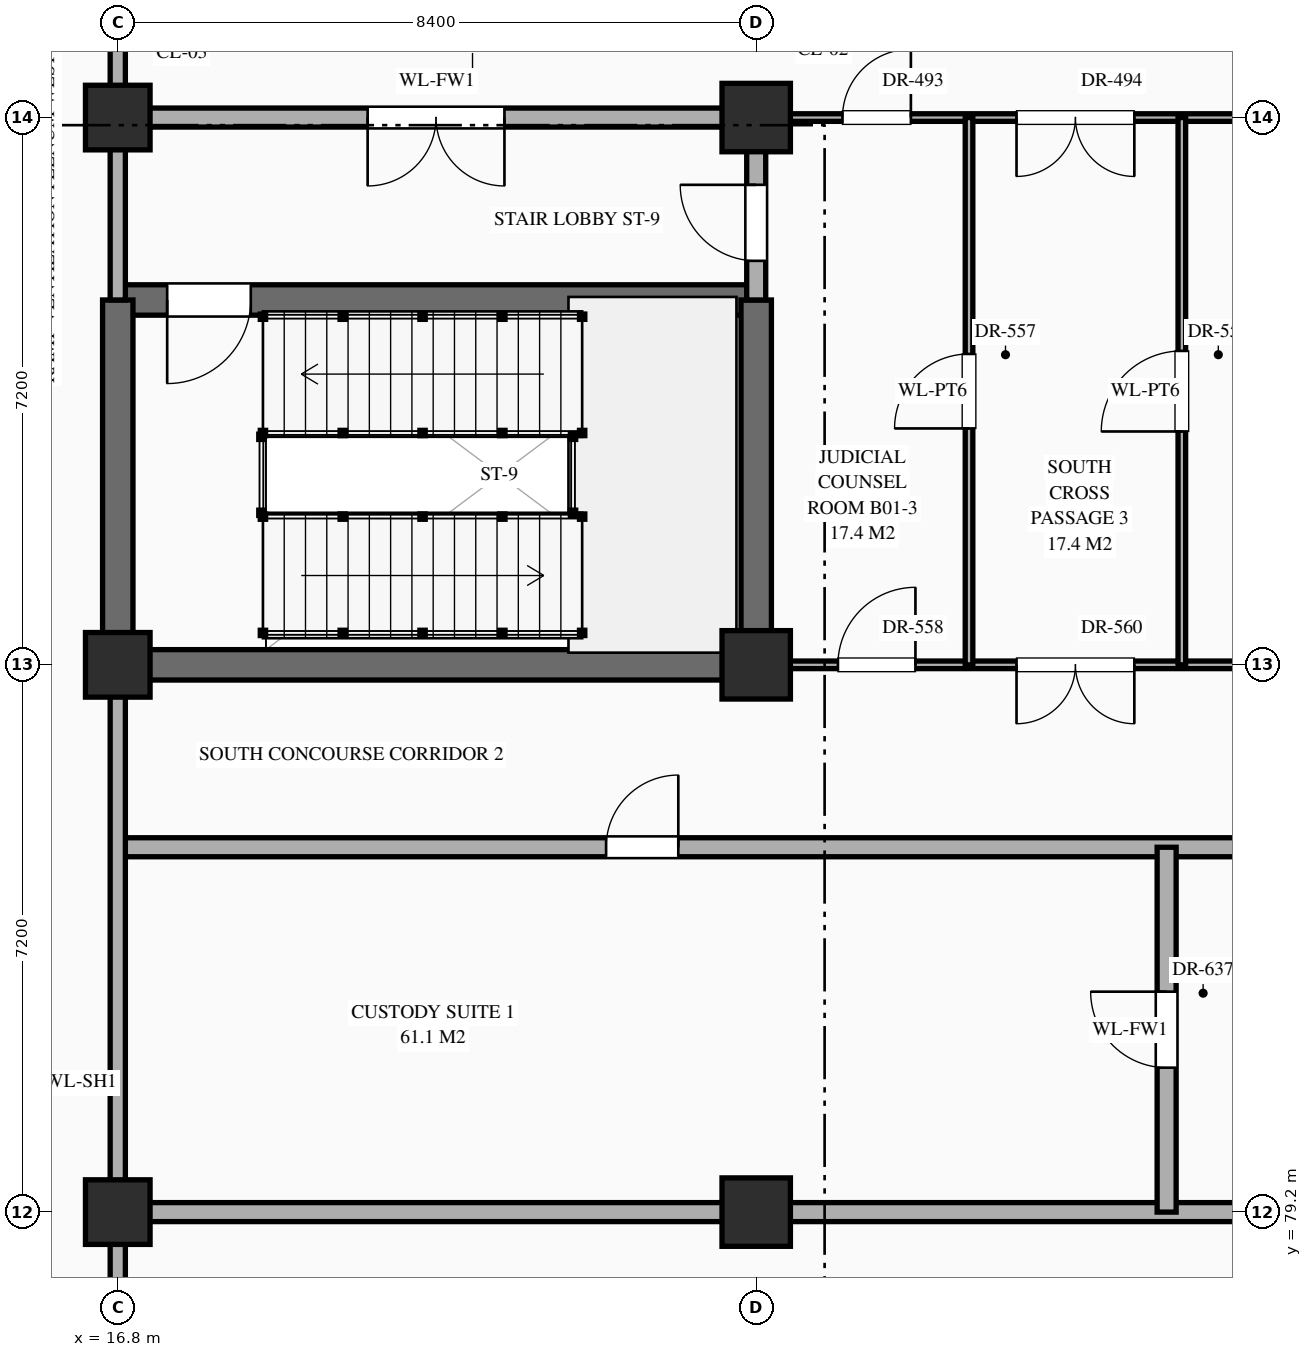
"""IFC4 building model, lengths in metres.
Left out: names, types, materials, properties, quantities, classifications, styles, units other than length and angle.
Written with IfcOpenShell. Run it as: python <this file> out.ifc"""

import sys

from ifc_helpers import new_model, si_unit, direction, frame, frame_2d, origin, origin_2d, place, context, subcontext, project, spatial, rectangle, extrude, element, fill, save


model = new_model("IFC4")
c1 = context("Model", 3, precision=1e-05, world=origin(), true_north=direction((0.0, 1.0)))
c2 = subcontext(c1, "Body", "Model", "MODEL_VIEW")
j1 = project(units=[si_unit("LENGTHUNIT", "METRE"), si_unit("PLANEANGLEUNIT", "RADIAN")], contexts=[c1])
p1 = place(None, origin())
s1 = spatial("IfcSite", under=j1, at=p1, CompositionType="ELEMENT")
p2 = place(p1, origin())
s2 = spatial("IfcBuilding", under=s1, at=p2, CompositionType="ELEMENT")
p3 = place(p2, frame((0.0, 0.0, -5.4)))
s3 = spatial("IfcBuildingStorey", under=s2, at=p3, CompositionType="ELEMENT", Elevation=-5.4)
for number, where, z_axis, x_axis in (
    (1, (16.8, 79.2, 0.0), (0.0, 0.0, 1.0), (1.0, 0.0, 0.0)),
    (2, (16.8, 86.4, 0.0), (0.0, 0.0, 1.0), (1.0, 0.0, 0.0)),
    (3, (16.8, 93.6, 0.0), (0.0, 0.0, 1.0), (1.0, 0.0, 0.0)),
):
    element("IfcColumn", number, at=place(p3, frame(where, z_axis=z_axis, x_axis=x_axis)), inside=s3, PredefinedType="COLUMN", context=c2, shape_type="SweptSolid", body=[
        extrude(rectangle(XDim=0.85, YDim=0.85, at=origin_2d()), origin(), (0.0, 0.0, 1.0), 5.4),
    ])
for number, where, z_axis, x_axis in (
    (4, (25.2, 79.2, 0.0), (0.0, 0.0, 1.0), (1.0, 0.0, 0.0)),
    (5, (25.2, 86.4, 0.0), (0.0, 0.0, 1.0), (1.0, 0.0, 0.0)),
    (6, (25.2, 93.6, 0.0), (0.0, 0.0, 1.0), (1.0, 0.0, 0.0)),
):
    element("IfcColumn", number, at=place(p3, frame(where, z_axis=z_axis, x_axis=x_axis)), inside=s3, PredefinedType="COLUMN", context=c2, shape_type="SweptSolid", body=[
        extrude(rectangle(XDim=0.9, YDim=0.9, at=origin_2d()), origin(), (0.0, 0.0, 1.0), 5.4),
    ])
p4 = place(p3, frame((16.8, 79.2, 0.0), z_axis=(0.0, 0.0, 1.0), x_axis=(1.0, 0.0, 0.0)))
e7 = element("IfcWall", 7, at=p4, inside=s3, PredefinedType="STANDARD", context=c2, shape_type="SweptSolid", body=[
    extrude(rectangle(XDim=33.6, YDim=0.25, at=frame_2d((16.8, 0.0))), origin(), (0.0, 0.0, 1.0), 4.13),
])
p5 = place(p3, frame((16.8, 84.0, 0.0), z_axis=(0.0, 0.0, 1.0), x_axis=(1.0, 0.0, 0.0)))
e8 = element("IfcWall", 8, at=p5, inside=s3, PredefinedType="STANDARD", context=c2, shape_type="SweptSolid", body=[
    extrude(rectangle(XDim=16.8, YDim=0.25, at=frame_2d((8.4, 0.0))), origin(), (0.0, 0.0, 1.0), 5.1),
])
p6 = place(p5, frame((6.425, 0.0, 0.0)))
e9 = element("IfcOpeningElement", 9, at=p6, cuts=e8, PredefinedType="OPENING", context=c2, shape_type="SweptSolid", body=[
    extrude(rectangle(XDim=0.95, YDim=2.15, at=frame_2d((0.475, 1.075))), frame((0.0, 0.137, 0.0), z_axis=(0.0, -1.0, 0.0), x_axis=(1.0, 0.0, 0.0)), (0.0, 0.0, 1.0), 0.274),
])
p7 = place(p3, frame((16.8, 86.4, 0.0), z_axis=(0.0, 0.0, 1.0), x_axis=(1.0, 0.0, 0.0)))
e10 = element("IfcWall", 10, at=p7, inside=s3, PredefinedType="SHEAR", context=c2, shape_type="SweptSolid", body=[
    extrude(rectangle(XDim=8.4, YDim=0.4, at=frame_2d((4.2, 0.0))), origin(), (0.0, 0.0, 1.0), 5.1),
])
p8 = place(p3, frame((25.2, 86.4, 0.0), z_axis=(0.0, 0.0, 1.0), x_axis=(1.0, 0.0, 0.0)))
e11 = element("IfcWall", 11, at=p8, inside=s3, PredefinedType="STANDARD", context=c2, shape_type="SweptSolid", body=[
    extrude(rectangle(XDim=16.8, YDim=0.1, at=frame_2d((8.4, 0.0))), origin(), (0.0, 0.0, 1.0), 4.25),
])
p9 = place(p8, frame((1.075, 0.0, 0.0)))
e12 = element("IfcOpeningElement", 12, at=p9, cuts=e11, PredefinedType="OPENING", context=c2, shape_type="SweptSolid", body=[
    extrude(rectangle(XDim=1.02, YDim=2.4, at=frame_2d((0.51, 1.2))), frame((0.0, 0.062, 0.0), z_axis=(0.0, -1.0, 0.0), x_axis=(1.0, 0.0, 0.0)), (0.0, 0.0, 1.0), 0.124),
])
p10 = place(p8, frame((3.425, 0.0, 0.0)))
e13 = element("IfcOpeningElement", 13, at=p10, cuts=e11, PredefinedType="OPENING", context=c2, shape_type="SweptSolid", body=[
    extrude(rectangle(XDim=1.55, YDim=2.35, at=frame_2d((0.775, 1.175))), frame((0.0, 0.062, 0.0), z_axis=(0.0, -1.0, 0.0), x_axis=(1.0, 0.0, 0.0)), (0.0, 0.0, 1.0), 0.124),
])
p11 = place(p8, frame((6.377, 0.0, 0.0)))
e14 = element("IfcOpeningElement", 14, at=p11, cuts=e11, PredefinedType="OPENING", context=c2, shape_type="SweptSolid", body=[
    extrude(rectangle(XDim=0.9, YDim=2.15, at=frame_2d((0.45, 1.075))), frame((0.0, 0.062, 0.0), z_axis=(0.0, -1.0, 0.0), x_axis=(1.0, 0.0, 0.0)), (0.0, 0.0, 1.0), 0.124),
])
p12 = place(p8, frame((12.157, 0.0, 0.0)))
e15 = element("IfcOpeningElement", 15, at=p12, cuts=e11, PredefinedType="OPENING", context=c2, shape_type="SweptSolid", body=[
    extrude(rectangle(XDim=0.86, YDim=2.1, at=frame_2d((0.43, 1.05))), frame((0.0, 0.062, 0.0), z_axis=(0.0, -1.0, 0.0), x_axis=(1.0, 0.0, 0.0)), (0.0, 0.0, 1.0), 0.124),
])
p13 = place(p3, frame((16.8, 91.2, 0.0), z_axis=(0.0, 0.0, 1.0), x_axis=(1.0, 0.0, 0.0)))
e16 = element("IfcWall", 16, at=p13, inside=s3, PredefinedType="SHEAR", context=c2, shape_type="SweptSolid", body=[
    extrude(rectangle(XDim=8.4, YDim=0.4, at=frame_2d((4.2, 0.0))), origin(), (0.0, 0.0, 1.0), 5.1),
])
p14 = place(p13, frame((0.65, 0.0, 0.0)))
e17 = element("IfcOpeningElement", 17, at=p14, cuts=e16, PredefinedType="OPENING", context=c2, shape_type="SweptSolid", body=[
    extrude(rectangle(XDim=1.1, YDim=2.2, at=frame_2d((0.55, 1.1))), frame((0.0, 0.212, 0.0), z_axis=(0.0, -1.0, 0.0), x_axis=(1.0, 0.0, 0.0)), (0.0, 0.0, 1.0), 0.424),
])
p15 = place(p3, frame((16.8, 93.6, 0.0), z_axis=(0.0, 0.0, 1.0), x_axis=(1.0, 0.0, 0.0)))
e18 = element("IfcWall", 18, at=p15, inside=s3, PredefinedType="STANDARD", context=c2, shape_type="SweptSolid", body=[
    extrude(rectangle(XDim=8.4, YDim=0.25, at=frame_2d((4.2, 0.0))), origin(), (0.0, 0.0, 1.0), 4.25),
])
p16 = place(p15, frame((3.288, 0.0, 0.0)))
e19 = element("IfcOpeningElement", 19, at=p16, cuts=e18, PredefinedType="OPENING", context=c2, shape_type="SweptSolid", body=[
    extrude(rectangle(XDim=1.8, YDim=2.35, at=frame_2d((0.9, 1.175))), frame((0.0, 0.137, 0.0), z_axis=(0.0, -1.0, 0.0), x_axis=(1.0, 0.0, 0.0)), (0.0, 0.0, 1.0), 0.274),
])
p17 = place(p3, frame((25.2, 93.6, 0.0), z_axis=(0.0, 0.0, 1.0), x_axis=(1.0, 0.0, 0.0)))
e20 = element("IfcWall", 20, at=p17, inside=s3, PredefinedType="STANDARD", context=c2, shape_type="SweptSolid", body=[
    extrude(rectangle(XDim=16.8, YDim=0.1, at=frame_2d((8.4, 0.0))), origin(), (0.0, 0.0, 1.0), 4.25),
])
p18 = place(p17, frame((1.135, 0.0, 0.0)))
e21 = element("IfcOpeningElement", 21, at=p18, cuts=e20, PredefinedType="OPENING", context=c2, shape_type="SweptSolid", body=[
    extrude(rectangle(XDim=0.9, YDim=2.15, at=frame_2d((0.45, 1.075))), frame((0.0, 0.062, 0.0), z_axis=(0.0, -1.0, 0.0), x_axis=(1.0, 0.0, 0.0)), (0.0, 0.0, 1.0), 0.124),
])
p19 = place(p17, frame((3.425, 0.0, 0.0)))
e22 = element("IfcOpeningElement", 22, at=p19, cuts=e20, PredefinedType="OPENING", context=c2, shape_type="SweptSolid", body=[
    extrude(rectangle(XDim=1.55, YDim=2.35, at=frame_2d((0.775, 1.175))), frame((0.0, 0.062, 0.0), z_axis=(0.0, -1.0, 0.0), x_axis=(1.0, 0.0, 0.0)), (0.0, 0.0, 1.0), 0.124),
])
p20 = place(p17, frame((6.367, 0.0, 0.0)))
e23 = element("IfcOpeningElement", 23, at=p20, cuts=e20, PredefinedType="OPENING", context=c2, shape_type="SweptSolid", body=[
    extrude(rectangle(XDim=0.92, YDim=2.15, at=frame_2d((0.46, 1.075))), frame((0.0, 0.062, 0.0), z_axis=(0.0, -1.0, 0.0), x_axis=(1.0, 0.0, 0.0)), (0.0, 0.0, 1.0), 0.124),
])
p21 = place(p17, frame((12.107, 0.0, 0.0)))
e24 = element("IfcOpeningElement", 24, at=p21, cuts=e20, PredefinedType="OPENING", context=c2, shape_type="SweptSolid", body=[
    extrude(rectangle(XDim=0.96, YDim=2.2, at=frame_2d((0.48, 1.1))), frame((0.0, 0.062, 0.0), z_axis=(0.0, -1.0, 0.0), x_axis=(1.0, 0.0, 0.0)), (0.0, 0.0, 1.0), 0.124),
])
p22 = place(p3, frame((16.8, 60.0, 0.0), z_axis=(0.0, 0.0, 1.0), x_axis=(0.0, 1.0, 0.0)))
e25 = element("IfcWall", 25, at=p22, inside=s3, PredefinedType="STANDARD", context=c2, shape_type="SweptSolid", body=[
    extrude(rectangle(XDim=26.4, YDim=0.2, at=frame_2d((13.2, 0.0))), origin(), (0.0, 0.0, 1.0), 4.23),
])
p23 = place(p3, frame((16.8, 86.4, 0.0), z_axis=(0.0, 0.0, 1.0), x_axis=(0.0, 1.0, 0.0)))
e26 = element("IfcWall", 26, at=p23, inside=s3, PredefinedType="SHEAR", context=c2, shape_type="SweptSolid", body=[
    extrude(rectangle(XDim=4.8, YDim=0.4, at=frame_2d((2.4, 0.0))), origin(), (0.0, 0.0, 1.0), 5.1),
])
p24 = place(p3, frame((16.8, 91.2, 0.0), z_axis=(0.0, 0.0, 1.0), x_axis=(0.0, 1.0, 0.0)))
e27 = element("IfcWall", 27, at=p24, inside=s3, PredefinedType="STANDARD", context=c2, shape_type="SweptSolid", body=[
    extrude(rectangle(XDim=16.8, YDim=0.2, at=frame_2d((8.4, 0.0))), origin(), (0.0, 0.0, 1.0), 4.35),
])
p25 = place(p3, frame((25.2, 86.4, 0.0), z_axis=(0.0, 0.0, 1.0), x_axis=(0.0, 1.0, 0.0)))
e28 = element("IfcWall", 28, at=p25, inside=s3, PredefinedType="SHEAR", context=c2, shape_type="SweptSolid", body=[
    extrude(rectangle(XDim=4.8, YDim=0.4, at=frame_2d((2.4, 0.0))), origin(), (0.0, 0.0, 1.0), 5.1),
])
p26 = place(p3, frame((25.2, 91.2, 0.0), z_axis=(0.0, 0.0, 1.0), x_axis=(0.0, 1.0, 0.0)))
e29 = element("IfcWall", 29, at=p26, inside=s3, PredefinedType="STANDARD", context=c2, shape_type="SweptSolid", body=[
    extrude(rectangle(XDim=2.4, YDim=0.25, at=frame_2d((1.2, 0.0))), origin(), (0.0, 0.0, 1.0), 4.35),
])
p27 = place(p26, frame((0.515, 0.0, 0.0)))
e30 = element("IfcOpeningElement", 30, at=p27, cuts=e29, PredefinedType="OPENING", context=c2, shape_type="SweptSolid", body=[
    extrude(rectangle(XDim=1.0, YDim=2.2, at=frame_2d((0.5, 1.1))), frame((0.0, 0.137, 0.0), z_axis=(0.0, -1.0, 0.0), x_axis=(1.0, 0.0, 0.0)), (0.0, 0.0, 1.0), 0.274),
])
p28 = place(p3, frame((28.0, 86.4, 0.0), z_axis=(0.0, 0.0, 1.0), x_axis=(0.0, 1.0, 0.0)))
e31 = element("IfcWall", 31, at=p28, inside=s3, PredefinedType="STANDARD", context=c2, shape_type="SweptSolid", body=[
    extrude(rectangle(XDim=7.2, YDim=0.1, at=frame_2d((3.6, 0.0))), origin(), (0.0, 0.0, 1.0), 5.1),
])
p29 = place(p28, frame((3.11, 0.0, 0.0)))
e32 = element("IfcOpeningElement", 32, at=p29, cuts=e31, PredefinedType="OPENING", context=c2, shape_type="SweptSolid", body=[
    extrude(rectangle(XDim=0.98, YDim=2.35, at=frame_2d((0.49, 1.175))), frame((0.0, 0.062, 0.0), z_axis=(0.0, -1.0, 0.0), x_axis=(1.0, 0.0, 0.0)), (0.0, 0.0, 1.0), 0.124),
])
p30 = place(p3, frame((30.6, 79.2, 0.0), z_axis=(0.0, 0.0, 1.0), x_axis=(0.0, 1.0, 0.0)))
e33 = element("IfcWall", 33, at=p30, inside=s3, PredefinedType="STANDARD", context=c2, shape_type="SweptSolid", body=[
    extrude(rectangle(XDim=4.8, YDim=0.25, at=frame_2d((2.4, 0.0))), origin(), (0.0, 0.0, 1.0), 5.1),
])
p31 = place(p30, frame((1.9, 0.0, 0.0)))
e34 = element("IfcOpeningElement", 34, at=p31, cuts=e33, PredefinedType="OPENING", context=c2, shape_type="SweptSolid", body=[
    extrude(rectangle(XDim=1.0, YDim=2.2, at=frame_2d((0.5, 1.1))), frame((0.0, 0.137, 0.0), z_axis=(0.0, -1.0, 0.0), x_axis=(1.0, 0.0, 0.0)), (0.0, 0.0, 1.0), 0.274),
])
p32 = place(p3, frame((30.8, 86.4, 0.0), z_axis=(0.0, 0.0, 1.0), x_axis=(0.0, 1.0, 0.0)))
e35 = element("IfcWall", 35, at=p32, inside=s3, PredefinedType="STANDARD", context=c2, shape_type="SweptSolid", body=[
    extrude(rectangle(XDim=7.2, YDim=0.1, at=frame_2d((3.6, 0.0))), origin(), (0.0, 0.0, 1.0), 5.1),
])
p33 = place(p32, frame((3.07, 0.0, 0.0)))
e36 = element("IfcOpeningElement", 36, at=p33, cuts=e35, PredefinedType="OPENING", context=c2, shape_type="SweptSolid", body=[
    extrude(rectangle(XDim=1.06, YDim=2.4, at=frame_2d((0.53, 1.2))), frame((0.0, 0.062, 0.0), z_axis=(0.0, -1.0, 0.0), x_axis=(1.0, 0.0, 0.0)), (0.0, 0.0, 1.0), 0.124),
])
p34 = place(p14, frame((1.1, 0.0, 0.0), z_axis=(0.0, 0.0, 1.0), x_axis=(-1.0, 0.0, 0.0)))
e37 = element("IfcDoor", 37, at=p34, inside=s3, OperationType="SINGLE_SWING_RIGHT", PredefinedType="DOOR", context=c2, shape_type="SweptSolid", body=[
    extrude(rectangle(XDim=1.1, YDim=2.2, at=frame_2d((0.55, 1.1))), frame((0.0, 0.025, 0.0), z_axis=(0.0, -1.0, 0.0), x_axis=(1.0, 0.0, 0.0)), (0.0, 0.0, 1.0), 0.05),
])
fill(e17, e37)
p35 = place(p16, frame((1.8, 0.0, 0.0), z_axis=(0.0, 0.0, 1.0), x_axis=(-1.0, 0.0, 0.0)))
e38 = element("IfcDoor", 38, at=p35, inside=s3, OperationType="DOUBLE_DOOR_SINGLE_SWING", PredefinedType="DOOR", context=c2, shape_type="SweptSolid", body=[
    extrude(rectangle(XDim=1.8, YDim=2.35, at=frame_2d((0.9, 1.175))), frame((0.0, 0.025, 0.0), z_axis=(0.0, -1.0, 0.0), x_axis=(1.0, 0.0, 0.0)), (0.0, 0.0, 1.0), 0.05),
])
fill(e19, e38)
p36 = place(p27, origin())
e39 = element("IfcDoor", 39, at=p36, inside=s3, OperationType="SINGLE_SWING_RIGHT", PredefinedType="DOOR", context=c2, shape_type="SweptSolid", body=[
    extrude(rectangle(XDim=1.0, YDim=2.2, at=frame_2d((0.5, 1.1))), frame((0.0, 0.025, 0.0), z_axis=(0.0, -1.0, 0.0), x_axis=(1.0, 0.0, 0.0)), (0.0, 0.0, 1.0), 0.05),
])
fill(e30, e39)
p37 = place(p18, origin())
e40 = element("IfcDoor", 40, at=p37, inside=s3, OperationType="SINGLE_SWING_RIGHT", PredefinedType="DOOR", context=c2, shape_type="SweptSolid", body=[
    extrude(rectangle(XDim=0.9, YDim=2.15, at=frame_2d((0.45, 1.075))), frame((0.0, 0.025, 0.0), z_axis=(0.0, -1.0, 0.0), x_axis=(1.0, 0.0, 0.0)), (0.0, 0.0, 1.0), 0.05),
])
fill(e21, e40)
p38 = place(p19, frame((1.55, 0.0, 0.0), z_axis=(0.0, 0.0, 1.0), x_axis=(-1.0, 0.0, 0.0)))
e41 = element("IfcDoor", 41, at=p38, inside=s3, OperationType="DOUBLE_DOOR_SINGLE_SWING", PredefinedType="DOOR", context=c2, shape_type="SweptSolid", body=[
    extrude(rectangle(XDim=1.55, YDim=2.35, at=frame_2d((0.775, 1.175))), frame((0.0, 0.025, 0.0), z_axis=(0.0, -1.0, 0.0), x_axis=(1.0, 0.0, 0.0)), (0.0, 0.0, 1.0), 0.05),
])
fill(e22, e41)
p39 = place(p29, origin())
e42 = element("IfcDoor", 42, at=p39, inside=s3, OperationType="SINGLE_SWING_LEFT", PredefinedType="DOOR", context=c2, shape_type="SweptSolid", body=[
    extrude(rectangle(XDim=0.98, YDim=2.35, at=frame_2d((0.49, 1.175))), frame((0.0, 0.025, 0.0), z_axis=(0.0, -1.0, 0.0), x_axis=(1.0, 0.0, 0.0)), (0.0, 0.0, 1.0), 0.05),
])
fill(e32, e42)
p40 = place(p9, origin())
e43 = element("IfcDoor", 43, at=p40, inside=s3, OperationType="SINGLE_SWING_RIGHT", PredefinedType="DOOR", context=c2, shape_type="SweptSolid", body=[
    extrude(rectangle(XDim=1.02, YDim=2.4, at=frame_2d((0.51, 1.2))), frame((0.0, 0.025, 0.0), z_axis=(0.0, -1.0, 0.0), x_axis=(1.0, 0.0, 0.0)), (0.0, 0.0, 1.0), 0.05),
])
fill(e12, e43)
p41 = place(p33, origin())
e44 = element("IfcDoor", 44, at=p41, inside=s3, OperationType="SINGLE_SWING_LEFT", PredefinedType="DOOR", context=c2, shape_type="SweptSolid", body=[
    extrude(rectangle(XDim=1.06, YDim=2.4, at=frame_2d((0.53, 1.2))), frame((0.0, 0.025, 0.0), z_axis=(0.0, -1.0, 0.0), x_axis=(1.0, 0.0, 0.0)), (0.0, 0.0, 1.0), 0.05),
])
fill(e36, e44)
p42 = place(p10, frame((1.55, 0.0, 0.0), z_axis=(0.0, 0.0, 1.0), x_axis=(-1.0, 0.0, 0.0)))
e45 = element("IfcDoor", 45, at=p42, inside=s3, OperationType="DOUBLE_DOOR_SINGLE_SWING", PredefinedType="DOOR", context=c2, shape_type="SweptSolid", body=[
    extrude(rectangle(XDim=1.55, YDim=2.35, at=frame_2d((0.775, 1.175))), frame((0.0, 0.025, 0.0), z_axis=(0.0, -1.0, 0.0), x_axis=(1.0, 0.0, 0.0)), (0.0, 0.0, 1.0), 0.05),
])
fill(e13, e45)
p43 = place(p6, origin())
e46 = element("IfcDoor", 46, at=p43, inside=s3, OperationType="SINGLE_SWING_RIGHT", PredefinedType="DOOR", context=c2, shape_type="SweptSolid", body=[
    extrude(rectangle(XDim=0.95, YDim=2.15, at=frame_2d((0.475, 1.075))), frame((0.0, 0.025, 0.0), z_axis=(0.0, -1.0, 0.0), x_axis=(1.0, 0.0, 0.0)), (0.0, 0.0, 1.0), 0.05),
])
fill(e9, e46)
p44 = place(p31, origin())
e47 = element("IfcDoor", 47, at=p44, inside=s3, OperationType="SINGLE_SWING_RIGHT", PredefinedType="DOOR", context=c2, shape_type="SweptSolid", body=[
    extrude(rectangle(XDim=1.0, YDim=2.2, at=frame_2d((0.5, 1.1))), frame((0.0, 0.025, 0.0), z_axis=(0.0, -1.0, 0.0), x_axis=(1.0, 0.0, 0.0)), (0.0, 0.0, 1.0), 0.05),
])
fill(e34, e47)
save(model, sys.argv[1])
